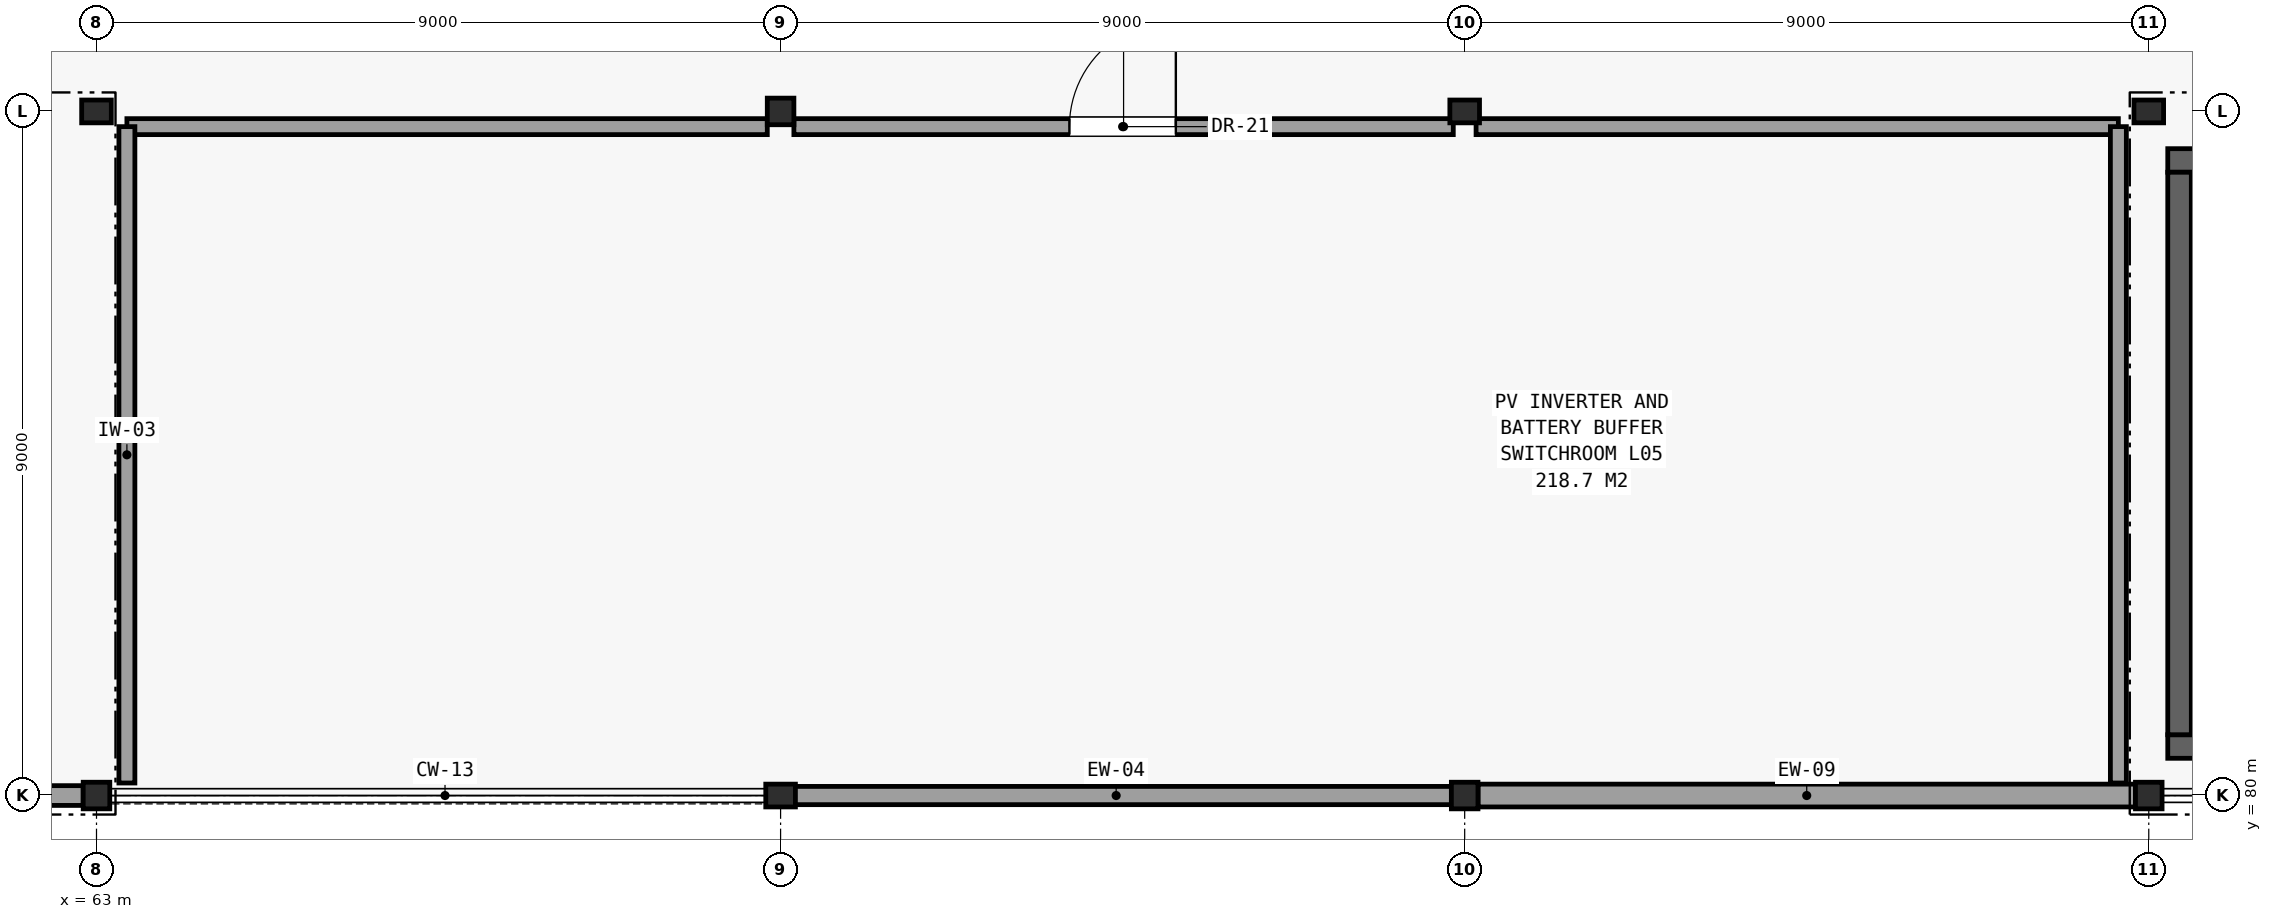
"""IFC4 building model, lengths in metres.
Left out: names, types, materials, properties, quantities, classifications, styles, units other than length and angle.
Written with IfcOpenShell. Run it as: python <this file> out.ifc"""

import sys

from ifc_helpers import new_model, si_unit, direction, frame, frame_2d, origin, origin_2d, place, context, subcontext, project, spatial, rectangle, hollow_rectangle, i_section, extrude, element, fill, save


model = new_model("IFC4")
c1 = context("Model", 3, precision=1e-05, world=origin(), true_north=direction((0.0, 1.0)))
c2 = subcontext(c1, "Body", "Model", "MODEL_VIEW")
j1 = project(units=[si_unit("LENGTHUNIT", "METRE"), si_unit("PLANEANGLEUNIT", "RADIAN")], contexts=[c1])
p1 = place(None, origin())
s1 = spatial("IfcSite", under=j1, at=p1, CompositionType="ELEMENT")
p2 = place(p1, origin())
s2 = spatial("IfcBuilding", under=s1, at=p2, CompositionType="ELEMENT")
p3 = place(p2, frame((0.0, 0.0, 21.9)))
s3 = spatial("IfcBuildingStorey", under=s2, at=p3, CompositionType="ELEMENT", Elevation=21.9)
p4 = place(p3, frame((63.0, 80.0, 0.0), z_axis=(0.0, 0.0, 1.0), x_axis=(1.0, 0.0, 0.0)))
e1 = element("IfcColumn", 1, at=p4, inside=s3, PredefinedType="COLUMN", context=c2, shape_type="SweptSolid", body=[
    extrude(hollow_rectangle(XDim=0.35, YDim=0.35, WallThickness=0.016, at=origin_2d()), origin(), (0.0, 0.0, 1.0), 4.2),
])
p5 = place(p3, frame((63.0, 89.0, 0.0), z_axis=(0.0, 0.0, 1.0), x_axis=(1.0, 0.0, 0.0)))
e2 = element("IfcColumn", 2, at=p5, inside=s3, PredefinedType="COLUMN", context=c2, shape_type="SweptSolid", body=[
    extrude(i_section(OverallWidth=0.3, OverallDepth=0.39, WebThickness=0.01, FlangeThickness=0.016, FilletRadius=0.013, at=origin_2d()), origin(), (0.0, 0.0, 1.0), 4.2),
])
p6 = place(p3, frame((72.0, 80.0, 0.0), z_axis=(0.0, 0.0, 1.0), x_axis=(1.0, 0.0, 0.0)))
e3 = element("IfcColumn", 3, at=p6, inside=s3, PredefinedType="COLUMN", context=c2, shape_type="SweptSolid", body=[
    extrude(i_section(OverallWidth=0.3, OverallDepth=0.39, WebThickness=0.01, FlangeThickness=0.016, FilletRadius=0.013, at=origin_2d()), origin(), (0.0, 0.0, 1.0), 4.14),
])
for number, where, z_axis, x_axis in (
    (4, (72.0, 89.0, 0.0), (0.0, 0.0, 1.0), (1.0, 0.0, 0.0)),
    (5, (81.0, 80.0, 0.0), (0.0, 0.0, 1.0), (1.0, 0.0, 0.0)),
):
    element("IfcColumn", number, at=place(p3, frame(where, z_axis=z_axis, x_axis=x_axis)), inside=s3, PredefinedType="COLUMN", context=c2, shape_type="SweptSolid", body=[
        extrude(hollow_rectangle(XDim=0.35, YDim=0.35, WallThickness=0.016, at=origin_2d()), origin(), (0.0, 0.0, 1.0), 4.14),
    ])
p7 = place(p3, frame((81.0, 89.0, 0.0), z_axis=(0.0, 0.0, 1.0), x_axis=(1.0, 0.0, 0.0)))
e6 = element("IfcColumn", 6, at=p7, inside=s3, PredefinedType="COLUMN", context=c2, shape_type="SweptSolid", body=[
    extrude(i_section(OverallWidth=0.3, OverallDepth=0.39, WebThickness=0.01, FlangeThickness=0.016, FilletRadius=0.013, at=origin_2d()), origin(), (0.0, 0.0, 1.0), 4.14),
])
p8 = place(p3, frame((90.0, 80.0, 0.0), z_axis=(0.0, 0.0, 1.0), x_axis=(1.0, 0.0, 0.0)))
e7 = element("IfcColumn", 7, at=p8, inside=s3, PredefinedType="COLUMN", context=c2, shape_type="SweptSolid", body=[
    extrude(hollow_rectangle(XDim=0.35, YDim=0.35, WallThickness=0.016, at=origin_2d()), origin(), (0.0, 0.0, 1.0), 4.14),
])
p9 = place(p3, frame((90.0, 89.0, 0.0), z_axis=(0.0, 0.0, 1.0), x_axis=(1.0, 0.0, 0.0)))
e8 = element("IfcColumn", 8, at=p9, inside=s3, PredefinedType="COLUMN", context=c2, shape_type="SweptSolid", body=[
    extrude(i_section(OverallWidth=0.3, OverallDepth=0.39, WebThickness=0.01, FlangeThickness=0.016, FilletRadius=0.013, at=origin_2d()), origin(), (0.0, 0.0, 1.0), 4.14),
])
p10 = place(p3, frame((54.175, 80.0, 0.0), z_axis=(0.0, 0.0, 1.0), x_axis=(1.0, 0.0, 0.0)))
e9 = element("IfcWall", 9, at=p10, inside=s3, PredefinedType="SOLIDWALL", context=c2, shape_type="SweptSolid", body=[
    extrude(rectangle(XDim=8.65, YDim=0.26, at=frame_2d((4.325, 0.0))), origin(), (0.0, 0.0, 1.0), 3.24),
])
p11 = place(p3, frame((72.004, 80.0, 0.0), z_axis=(0.0, 0.0, 1.0), x_axis=(1.0, 0.0, 0.0)))
e10 = element("IfcWall", 10, at=p11, inside=s3, PredefinedType="SOLIDWALL", context=c2, shape_type="SweptSolid", body=[
    extrude(rectangle(XDim=8.821, YDim=0.24, at=frame_2d((4.41, 0.0))), origin(), (0.0, 0.0, 1.0), 3.22),
])
p12 = place(p3, frame((81.175, 80.0, 0.0), z_axis=(0.0, 0.0, 1.0), x_axis=(1.0, 0.0, 0.0)))
e11 = element("IfcWall", 11, at=p12, inside=s3, PredefinedType="SOLIDWALL", context=c2, shape_type="SweptSolid", body=[
    extrude(rectangle(XDim=8.65, YDim=0.3, at=frame_2d((4.325, 0.0))), origin(), (0.0, 0.0, 1.0), 3.22),
])
for number, where, z_axis, x_axis in (
    (12, (90.25, 80.645, 0.0), (0.0, 0.0, 1.0), (1.0, 0.0, 0.0)),
    (13, (90.25, 88.355, 0.0), (0.0, 0.0, 1.0), (1.0, 0.0, 0.0)),
):
    element("IfcWall", number, at=place(p3, frame(where, z_axis=z_axis, x_axis=x_axis)), inside=s3, PredefinedType="SHEAR", context=c2, shape_type="SweptSolid", body=[
        extrude(rectangle(XDim=3.9, YDim=0.31, at=frame_2d((1.95, 0.0))), origin(), (0.0, 0.0, 1.0), 3.92),
    ])
p13 = place(p3, frame((90.405, 80.8, 0.0), z_axis=(0.0, 0.0, 1.0), x_axis=(0.0, 1.0, 0.0)))
e14 = element("IfcWall", 14, at=p13, inside=s3, PredefinedType="SHEAR", context=c2, shape_type="SweptSolid", body=[
    extrude(rectangle(XDim=7.4, YDim=0.31, at=frame_2d((3.7, 0.0))), origin(), (0.0, 0.0, 1.0), 3.92),
])
p14 = place(p3, frame((63.4, 88.8, 0.0), z_axis=(0.0, 0.0, 1.0), x_axis=(1.0, 0.0, 0.0)))
e15 = element("IfcWall", 15, at=p14, inside=s3, PredefinedType="PARTITIONING", context=c2, shape_type="SweptSolid", body=[
    extrude(rectangle(XDim=8.425, YDim=0.21, at=frame_2d((4.212, 0.0))), origin(), (0.0, 0.0, 1.0), 3.22),
])
p15 = place(p3, frame((72.175, 88.8, 0.0), z_axis=(0.0, 0.0, 1.0), x_axis=(1.0, 0.0, 0.0)))
e16 = element("IfcWall", 16, at=p15, inside=s3, PredefinedType="PARTITIONING", context=c2, shape_type="SweptSolid", body=[
    extrude(rectangle(XDim=8.675, YDim=0.21, at=frame_2d((4.337, 0.0))), origin(), (0.0, 0.0, 1.0), 3.22),
])
p16 = place(p15, frame((3.625, 0.0, 0.0)))
e17 = element("IfcOpeningElement", 17, at=p16, cuts=e16, PredefinedType="OPENING", context=c2, shape_type="SweptSolid", body=[
    extrude(rectangle(XDim=1.4, YDim=2.2, at=frame_2d((0.7, 1.1))), frame((0.0, 0.116, 0.0), z_axis=(0.0, -1.0, 0.0), x_axis=(1.0, 0.0, 0.0)), (0.0, 0.0, 1.0), 0.232),
])
p17 = place(p3, frame((81.15, 88.8, 0.0), z_axis=(0.0, 0.0, 1.0), x_axis=(1.0, 0.0, 0.0)))
e18 = element("IfcWall", 18, at=p17, inside=s3, PredefinedType="PARTITIONING", context=c2, shape_type="SweptSolid", body=[
    extrude(rectangle(XDim=8.45, YDim=0.21, at=frame_2d((4.225, 0.0))), origin(), (0.0, 0.0, 1.0), 3.22),
])
for number, where, z_axis, x_axis in (
    (19, (63.4, 80.165, 0.0), (0.0, 0.0, 1.0), (0.0, 1.0, 0.0)),
    (20, (89.6, 80.165, 0.0), (0.0, 0.0, 1.0), (0.0, 1.0, 0.0)),
):
    element("IfcWall", number, at=place(p3, frame(where, z_axis=z_axis, x_axis=x_axis)), inside=s3, PredefinedType="PARTITIONING", context=c2, shape_type="SweptSolid", body=[
        extrude(rectangle(XDim=8.635, YDim=0.21, at=frame_2d((4.317, 0.0))), origin(), (0.0, 0.0, 1.0), 3.332),
    ])
p18 = place(p16, origin())
e21 = element("IfcDoor", 21, at=p18, inside=s3, OperationType="SINGLE_SWING_RIGHT", PredefinedType="DOOR", context=c2, shape_type="SweptSolid", body=[
    extrude(rectangle(XDim=1.4, YDim=2.2, at=frame_2d((0.7, 1.1))), frame((0.0, 0.025, 0.0), z_axis=(0.0, -1.0, 0.0), x_axis=(1.0, 0.0, 0.0)), (0.0, 0.0, 1.0), 0.05),
])
fill(e17, e21)
save(model, sys.argv[1])
